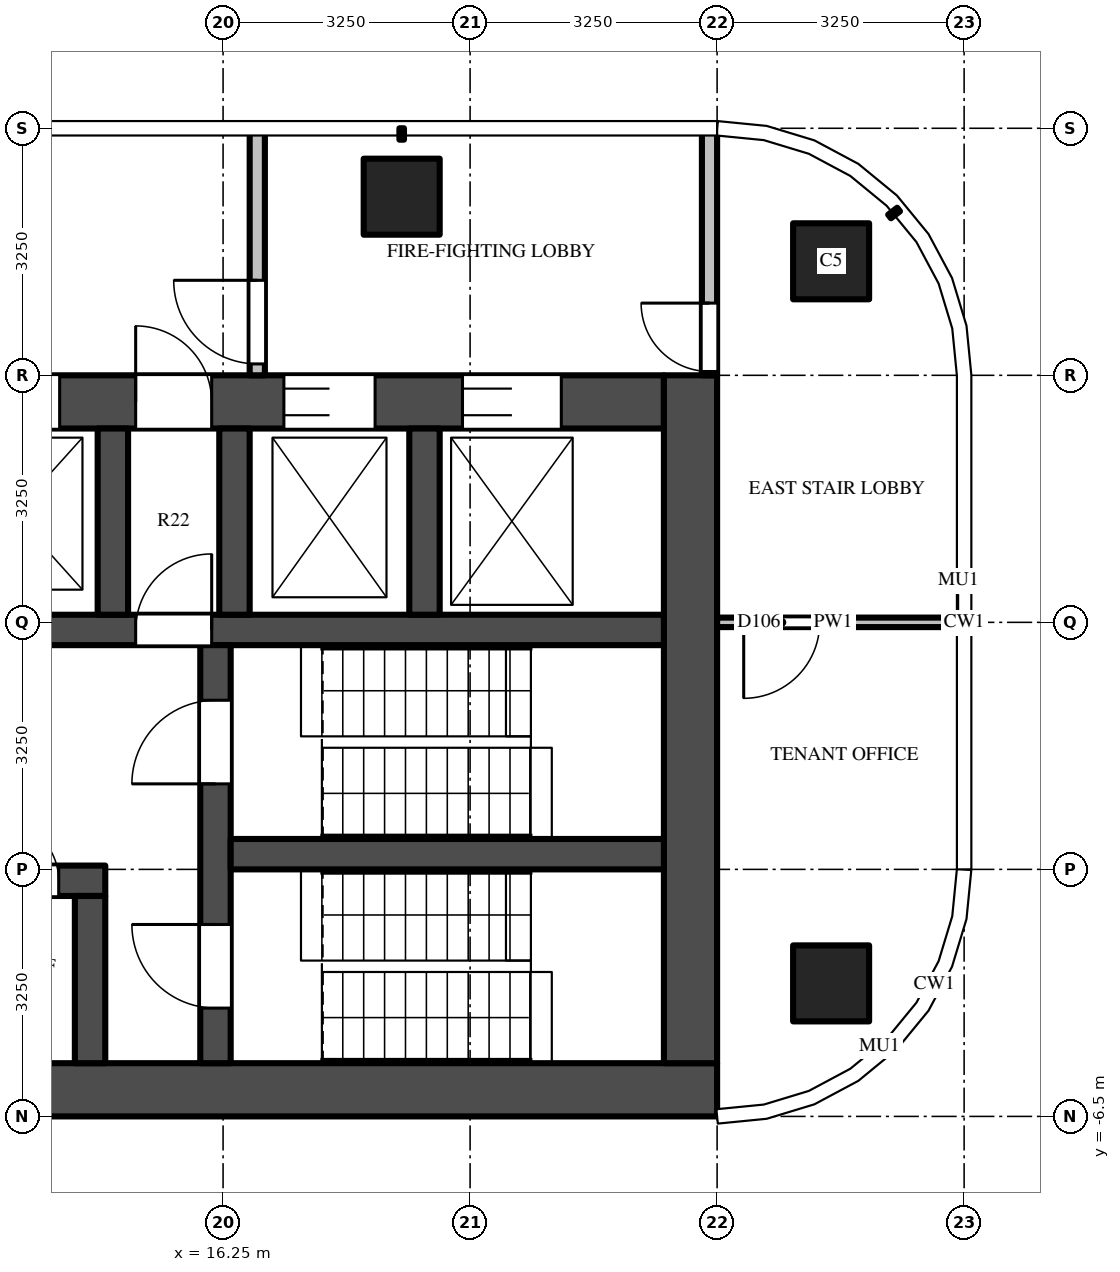
"""IFC4 building model, lengths in metres.
Left out: names, types, materials, properties, quantities, classifications, styles, units other than length and angle.
Written with IfcOpenShell. Run it as: python <this file> out.ifc"""

import sys

from ifc_helpers import new_model, si_unit, direction, frame, frame_2d, origin, origin_2d, place, context, subcontext, project, spatial, rectangle, extrude, source, transform, mapped, element, fill, save


model = new_model("IFC4")
c1 = context("Model", 3, precision=1e-05, world=origin(), true_north=direction((0.0, 1.0)))
c2 = subcontext(c1, "Body", "Model", "MODEL_VIEW")
j1 = project(units=[si_unit("LENGTHUNIT", "METRE"), si_unit("PLANEANGLEUNIT", "RADIAN")], contexts=[c1])
p1 = place(None, origin())
s1 = spatial("IfcSite", under=j1, at=p1, CompositionType="ELEMENT")
p2 = place(p1, origin())
s2 = spatial("IfcBuilding", under=s1, at=p2, CompositionType="ELEMENT")
p3 = place(p2, frame((0.0, 0.0, 314.5)))
s3 = spatial("IfcBuildingStorey", under=s2, at=p3, CompositionType="ELEMENT", Elevation=314.5)
m1 = source(origin(), c2, "Body", "SweptSolid", [
    extrude(rectangle(XDim=1.0, YDim=1.0, at=origin_2d()), origin(), (0.0, 0.0, 1.0), 3.9),
])
for number, where, z_axis, x_axis in (
    (1, (18.6, 5.6, 0.0), (0.0, 0.0, 1.0), (1.0, 0.0, 0.0)),
    (2, (24.25, 4.75, 0.0), (0.0, 0.0, 1.0), (1.0, 0.0, 0.0)),
    (3, (24.25, -4.75, 0.0), (0.0, 0.0, 1.0), (1.0, 0.0, 0.0)),
):
    element("IfcColumn", number, at=place(p3, frame(where, z_axis=z_axis, x_axis=x_axis)), inside=s3, PredefinedType="COLUMN", context=c2, shape_type="MappedRepresentation", body=[
        mapped(m1, transform((0.0, 0.0, 0.0))),
    ])
m2 = source(origin(), c2, "Body", "SweptSolid", [
    extrude(rectangle(XDim=16.65, YDim=0.7, at=frame_2d((8.325, 0.0))), origin(), (0.0, 0.0, 1.0), 3.7),
])
p4 = place(p3, frame((6.1, -6.15, 0.0), z_axis=(0.0, 0.0, 1.0), x_axis=(1.0, 0.0, 0.0)))
e4 = element("IfcWall", 4, at=p4, inside=s3, PredefinedType="SHEAR", context=c2, shape_type="MappedRepresentation", body=[
    mapped(m2, transform((0.0, 0.0, 0.0))),
])
m3 = source(origin(), c2, "Body", "SweptSolid", [
    extrude(rectangle(XDim=14.85, YDim=0.7, at=frame_2d((7.425, 0.0))), origin(), (0.0, 0.0, 1.0), 3.7),
])
p5 = place(p3, frame((7.2, 2.9, 0.0), z_axis=(0.0, 0.0, 1.0), x_axis=(1.0, 0.0, 0.0)))
e5 = element("IfcWall", 5, at=p5, inside=s3, PredefinedType="SHEAR", context=c2, shape_type="MappedRepresentation", body=[
    mapped(m3, transform((0.0, 0.0, 0.0))),
])
m4 = source(origin(), c2, "Body", "SweptSolid", [
    extrude(rectangle(XDim=1.2, YDim=2.1, at=frame_2d((0.6, 1.05))), frame((0.0, 0.36, 0.0), z_axis=(0.0, -1.0, 0.0), x_axis=(1.0, 0.0, 0.0)), (0.0, 0.0, 1.0), 0.72),
])
p6 = place(p5, frame((5.7, 0.0, 0.0)))
e6 = element("IfcOpeningElement", 6, at=p6, cuts=e5, PredefinedType="OPENING", context=c2, shape_type="MappedRepresentation", body=[
    mapped(m4, transform((0.0, 0.0, 0.0))),
])
m5 = source(origin(), c2, "Body", "SweptSolid", [
    extrude(rectangle(XDim=1.3, YDim=2.1, at=frame_2d((0.65, 1.05))), frame((0.0, 0.36, 0.0), z_axis=(0.0, -1.0, 0.0), x_axis=(1.0, 0.0, 0.0)), (0.0, 0.0, 1.0), 0.72),
])
p7 = place(p5, frame((12.2, 0.0, 0.0)))
e7 = element("IfcOpeningElement", 7, at=p7, cuts=e5, PredefinedType="OPENING", context=c2, shape_type="MappedRepresentation", body=[
    mapped(m5, transform((0.0, 0.0, 0.0))),
])
p8 = place(p5, frame((9.85, 0.0, 0.0)))
e8 = element("IfcOpeningElement", 8, at=p8, cuts=e5, PredefinedType="OPENING", context=c2, shape_type="MappedRepresentation", body=[
    mapped(m4, transform((0.0, 0.0, 0.0))),
])
m6 = source(origin(), c2, "Body", "SweptSolid", [
    extrude(rectangle(XDim=1.0, YDim=2.1, at=frame_2d((0.5, 1.05))), frame((0.0, 0.36, 0.0), z_axis=(0.0, -1.0, 0.0), x_axis=(1.0, 0.0, 0.0)), (0.0, 0.0, 1.0), 0.72),
])
p9 = place(p5, frame((7.9, 0.0, 0.0)))
e9 = element("IfcOpeningElement", 9, at=p9, cuts=e5, PredefinedType="OPENING", context=c2, shape_type="MappedRepresentation", body=[
    mapped(m6, transform((0.0, 0.0, 0.0))),
])
p10 = place(p5, frame((1.262, 0.0, 0.0)))
e10 = element("IfcOpeningElement", 10, at=p10, cuts=e5, PredefinedType="OPENING", context=c2, shape_type="MappedRepresentation", body=[
    mapped(m6, transform((0.0, 0.0, 0.0))),
])
m7 = source(origin(), c2, "Body", "SweptSolid", [
    extrude(rectangle(XDim=0.8, YDim=2.1, at=frame_2d((0.4, 1.05))), frame((0.0, 0.36, 0.0), z_axis=(0.0, -1.0, 0.0), x_axis=(1.0, 0.0, 0.0)), (0.0, 0.0, 1.0), 0.72),
])
p11 = place(p5, frame((3.837, 0.0, 0.0)))
e11 = element("IfcOpeningElement", 11, at=p11, cuts=e5, PredefinedType="OPENING", context=c2, shape_type="MappedRepresentation", body=[
    mapped(m7, transform((0.0, 0.0, 0.0))),
])
m8 = source(origin(), c2, "Body", "SweptSolid", [
    extrude(rectangle(XDim=9.05, YDim=0.7, at=frame_2d((4.525, 0.0))), origin(), (0.0, 0.0, 1.0), 3.7),
])
p12 = place(p3, frame((22.4, -5.8, 0.0), z_axis=(0.0, 0.0, 1.0), x_axis=(0.0, 1.0, 0.0)))
e12 = element("IfcWall", 12, at=p12, inside=s3, PredefinedType="SHEAR", context=c2, shape_type="MappedRepresentation", body=[
    mapped(m8, transform((0.0, 0.0, 0.0))),
])
m9 = source(origin(), c2, "Body", "SweptSolid", [
    extrude(rectangle(XDim=7.5, YDim=0.4, at=frame_2d((3.75, 0.0))), origin(), (0.0, 0.0, 1.0), 3.7),
])
p13 = place(p3, frame((7.2, -3.4, 0.0), z_axis=(0.0, 0.0, 1.0), x_axis=(1.0, 0.0, 0.0)))
e13 = element("IfcWall", 13, at=p13, inside=s3, PredefinedType="SHEAR", context=c2, shape_type="MappedRepresentation", body=[
    mapped(m9, transform((0.0, 0.0, 0.0))),
])
m10 = source(origin(), c2, "Body", "SweptSolid", [
    extrude(rectangle(XDim=0.8, YDim=2.1, at=frame_2d((0.4, 1.05))), frame((0.0, 0.21, 0.0), z_axis=(0.0, -1.0, 0.0), x_axis=(1.0, 0.0, 0.0)), (0.0, 0.0, 1.0), 0.42),
])
p14 = place(p13, frame((0.212, 0.0, 0.0)))
e14 = element("IfcOpeningElement", 14, at=p14, cuts=e13, PredefinedType="OPENING", context=c2, shape_type="MappedRepresentation", body=[
    mapped(m10, transform((0.0, 0.0, 0.0))),
])
m11 = source(origin(), c2, "Body", "SweptSolid", [
    extrude(rectangle(XDim=1.0, YDim=2.1, at=frame_2d((0.5, 1.05))), frame((0.0, 0.21, 0.0), z_axis=(0.0, -1.0, 0.0), x_axis=(1.0, 0.0, 0.0)), (0.0, 0.0, 1.0), 0.42),
])
p15 = place(p13, frame((3.05, 0.0, 0.0)))
e15 = element("IfcOpeningElement", 15, at=p15, cuts=e13, PredefinedType="OPENING", context=c2, shape_type="MappedRepresentation", body=[
    mapped(m11, transform((0.0, 0.0, 0.0))),
])
p16 = place(p13, frame((6.087, 0.0, 0.0)))
e16 = element("IfcOpeningElement", 16, at=p16, cuts=e13, PredefinedType="OPENING", context=c2, shape_type="MappedRepresentation", body=[
    mapped(m10, transform((0.0, 0.0, 0.0))),
])
m12 = source(origin(), c2, "Body", "SweptSolid", [
    extrude(rectangle(XDim=14.85, YDim=0.4, at=frame_2d((7.425, 0.0))), origin(), (0.0, 0.0, 1.0), 3.7),
])
p17 = place(p3, frame((7.2, -0.1, 0.0), z_axis=(0.0, 0.0, 1.0), x_axis=(1.0, 0.0, 0.0)))
e17 = element("IfcWall", 17, at=p17, inside=s3, PredefinedType="SHEAR", context=c2, shape_type="MappedRepresentation", body=[
    mapped(m12, transform((0.0, 0.0, 0.0))),
])
p18 = place(p17, frame((7.9, 0.0, 0.0)))
e18 = element("IfcOpeningElement", 18, at=p18, cuts=e17, PredefinedType="OPENING", context=c2, shape_type="MappedRepresentation", body=[
    mapped(m11, transform((0.0, 0.0, 0.0))),
])
m13 = source(origin(), c2, "Body", "SweptSolid", [
    extrude(rectangle(XDim=5.5, YDim=0.4, at=frame_2d((2.75, 0.0))), origin(), (0.0, 0.0, 1.0), 3.7),
])
p19 = place(p3, frame((16.15, -5.8, 0.0), z_axis=(0.0, 0.0, 1.0), x_axis=(0.0, 1.0, 0.0)))
e19 = element("IfcWall", 19, at=p19, inside=s3, PredefinedType="SHEAR", context=c2, shape_type="MappedRepresentation", body=[
    mapped(m13, transform((0.0, 0.0, 0.0))),
])
m14 = source(origin(), c2, "Body", "SweptSolid", [
    extrude(rectangle(XDim=1.1, YDim=2.1, at=frame_2d((0.55, 1.05))), frame((0.0, 0.21, 0.0), z_axis=(0.0, -1.0, 0.0), x_axis=(1.0, 0.0, 0.0)), (0.0, 0.0, 1.0), 0.42),
])
p20 = place(p19, frame((0.725, 0.0, 0.0)))
e20 = element("IfcOpeningElement", 20, at=p20, cuts=e19, PredefinedType="OPENING", context=c2, shape_type="MappedRepresentation", body=[
    mapped(m14, transform((0.0, 0.0, 0.0))),
])
p21 = place(p19, frame((3.675, 0.0, 0.0)))
e21 = element("IfcOpeningElement", 21, at=p21, cuts=e19, PredefinedType="OPENING", context=c2, shape_type="MappedRepresentation", body=[
    mapped(m14, transform((0.0, 0.0, 0.0))),
])
m15 = source(origin(), c2, "Body", "SweptSolid", [
    extrude(rectangle(XDim=5.7, YDim=0.4, at=frame_2d((2.85, 0.0))), origin(), (0.0, 0.0, 1.0), 3.7),
])
p22 = place(p3, frame((16.35, -3.05, 0.0), z_axis=(0.0, 0.0, 1.0), x_axis=(1.0, 0.0, 0.0)))
e22 = element("IfcWall", 22, at=p22, inside=s3, PredefinedType="SHEAR", context=c2, shape_type="MappedRepresentation", body=[
    mapped(m15, transform((0.0, 0.0, 0.0))),
])
m16 = source(origin(), c2, "Body", "SweptSolid", [
    extrude(rectangle(XDim=2.2, YDim=0.4, at=frame_2d((1.1, 0.0))), origin(), (0.0, 0.0, 1.0), 3.7),
])
p23 = place(p3, frame((14.5, -5.8, 0.0), z_axis=(0.0, 0.0, 1.0), x_axis=(0.0, 1.0, 0.0)))
e23 = element("IfcWall", 23, at=p23, inside=s3, PredefinedType="SHEAR", context=c2, shape_type="MappedRepresentation", body=[
    mapped(m16, transform((0.0, 0.0, 0.0))),
])
m17 = source(origin(), c2, "Body", "SweptSolid", [
    extrude(rectangle(XDim=2.45, YDim=0.4, at=frame_2d((1.225, 0.0))), origin(), (0.0, 0.0, 1.0), 3.7),
])
for number, where, z_axis, x_axis in (
    (24, (14.8, 0.1, 0.0), (0.0, 0.0, 1.0), (0.0, 1.0, 0.0)),
    (25, (16.4, 0.1, 0.0), (0.0, 0.0, 1.0), (0.0, 1.0, 0.0)),
    (26, (18.9, 0.1, 0.0), (0.0, 0.0, 1.0), (0.0, 1.0, 0.0)),
):
    element("IfcWall", number, at=place(p3, frame(where, z_axis=z_axis, x_axis=x_axis)), inside=s3, PredefinedType="SHEAR", context=c2, shape_type="MappedRepresentation", body=[
        mapped(m17, transform((0.0, 0.0, 0.0))),
    ])
m18 = source(origin(), c2, "Body", "SweptSolid", [
    extrude(rectangle(XDim=3.25, YDim=0.2, at=frame_2d((1.625, 0.0))), origin(), (0.0, 0.0, 1.0), 3.7),
])
p24 = place(p3, frame((16.7, 3.25, 0.0), z_axis=(0.0, 0.0, 1.0), x_axis=(0.0, 1.0, 0.0)))
e27 = element("IfcWall", 27, at=p24, inside=s3, PredefinedType="PARTITIONING", context=c2, shape_type="MappedRepresentation", body=[
    mapped(m18, transform((0.0, 0.0, 0.0))),
])
m19 = source(origin(), c2, "Body", "SweptSolid", [
    extrude(rectangle(XDim=1.1, YDim=2.1, at=frame_2d((0.55, 1.05))), frame((0.0, 0.11, 0.0), z_axis=(0.0, -1.0, 0.0), x_axis=(1.0, 0.0, 0.0)), (0.0, 0.0, 1.0), 0.22),
])
p25 = place(p24, frame((0.15, 0.0, 0.0)))
e28 = element("IfcOpeningElement", 28, at=p25, cuts=e27, PredefinedType="OPENING", context=c2, shape_type="MappedRepresentation", body=[
    mapped(m19, transform((0.0, 0.0, 0.0))),
])
p26 = place(p3, frame((22.65, 3.25, 0.0), z_axis=(0.0, 0.0, 1.0), x_axis=(0.0, 1.0, 0.0)))
e29 = element("IfcWall", 29, at=p26, inside=s3, PredefinedType="PARTITIONING", context=c2, shape_type="MappedRepresentation", body=[
    mapped(m18, transform((0.0, 0.0, 0.0))),
])
m20 = source(origin(), c2, "Body", "SweptSolid", [
    extrude(rectangle(XDim=0.9, YDim=2.1, at=frame_2d((0.45, 1.05))), frame((0.0, 0.11, 0.0), z_axis=(0.0, -1.0, 0.0), x_axis=(1.0, 0.0, 0.0)), (0.0, 0.0, 1.0), 0.22),
])
p27 = place(p26, frame((0.05, 0.0, 0.0)))
e30 = element("IfcOpeningElement", 30, at=p27, cuts=e29, PredefinedType="OPENING", context=c2, shape_type="MappedRepresentation", body=[
    mapped(m20, transform((0.0, 0.0, 0.0))),
])
m21 = source(origin(), c2, "Body", "SweptSolid", [
    extrude(rectangle(XDim=3.05, YDim=0.125, at=frame_2d((1.525, 0.0))), origin(), (0.0, 0.0, 1.0), 2.78),
])
p28 = place(p3, frame((25.8, 0.0, 0.0), z_axis=(0.0, 0.0, 1.0), x_axis=(-1.0, 0.0, 0.0)))
e31 = element("IfcWall", 31, at=p28, inside=s3, PredefinedType="PARTITIONING", context=c2, shape_type="MappedRepresentation", body=[
    mapped(m21, transform((0.0, 0.0, 0.0))),
])
m22 = source(origin(), c2, "Body", "SweptSolid", [
    extrude(rectangle(XDim=1.0, YDim=2.1, at=frame_2d((0.5, 1.05))), frame((0.0, 0.073, 0.0), z_axis=(0.0, -1.0, 0.0), x_axis=(1.0, 0.0, 0.0)), (0.0, 0.0, 1.0), 0.145),
])
p29 = place(p28, frame((1.7, 0.0, 0.0)))
e32 = element("IfcOpeningElement", 32, at=p29, cuts=e31, PredefinedType="OPENING", context=c2, shape_type="MappedRepresentation", body=[
    mapped(m22, transform((0.0, 0.0, 0.0))),
])
m23 = source(origin(), c2, "Body", "SweptSolid", [
    extrude(rectangle(XDim=1.2, YDim=2.1, at=frame_2d((0.6, 1.05))), frame((0.0, -0.275, 0.0), z_axis=(0.0, -1.0, 0.0), x_axis=(1.0, 0.0, 0.0)), (0.0, 0.0, 1.0), 0.05),
])
p30 = place(p6, origin())
e33 = element("IfcDoor", 33, at=p30, inside=s3, OperationType="DOUBLE_DOOR_SLIDING", PredefinedType="DOOR", context=c2, shape_type="MappedRepresentation", body=[
    mapped(m23, transform((0.0, 0.0, 0.0))),
])
fill(e6, e33)
m24 = source(origin(), c2, "Body", "SweptSolid", [
    extrude(rectangle(XDim=1.3, YDim=2.1, at=frame_2d((0.65, 1.05))), frame((0.0, -0.275, 0.0), z_axis=(0.0, -1.0, 0.0), x_axis=(1.0, 0.0, 0.0)), (0.0, 0.0, 1.0), 0.05),
])
p31 = place(p7, origin())
e34 = element("IfcDoor", 34, at=p31, inside=s3, OperationType="DOUBLE_DOOR_SLIDING", PredefinedType="DOOR", context=c2, shape_type="MappedRepresentation", body=[
    mapped(m24, transform((0.0, 0.0, 0.0))),
])
fill(e7, e34)
p32 = place(p8, origin())
e35 = element("IfcDoor", 35, at=p32, inside=s3, OperationType="DOUBLE_DOOR_SLIDING", PredefinedType="DOOR", context=c2, shape_type="MappedRepresentation", body=[
    mapped(m23, transform((0.0, 0.0, 0.0))),
])
fill(e8, e35)
m25 = source(origin(), c2, "Body", "SweptSolid", [
    extrude(rectangle(XDim=1.1, YDim=2.1, at=frame_2d((0.55, 1.05))), frame((0.0, 0.025, 0.0), z_axis=(0.0, -1.0, 0.0), x_axis=(1.0, 0.0, 0.0)), (0.0, 0.0, 1.0), 0.05),
])
p33 = place(p20, origin())
e36 = element("IfcDoor", 36, at=p33, inside=s3, OperationType="SINGLE_SWING_RIGHT", PredefinedType="DOOR", context=c2, shape_type="MappedRepresentation", body=[
    mapped(m25, transform((0.0, 0.0, 0.0))),
])
fill(e20, e36)
p34 = place(p21, origin())
e37 = element("IfcDoor", 37, at=p34, inside=s3, OperationType="SINGLE_SWING_LEFT", PredefinedType="DOOR", context=c2, shape_type="MappedRepresentation", body=[
    mapped(m25, transform((0.0, 0.0, 0.0))),
])
fill(e21, e37)
m26 = source(origin(), c2, "Body", "SweptSolid", [
    extrude(rectangle(XDim=1.0, YDim=2.1, at=frame_2d((0.5, 1.05))), frame((0.0, 0.025, 0.0), z_axis=(0.0, -1.0, 0.0), x_axis=(1.0, 0.0, 0.0)), (0.0, 0.0, 1.0), 0.05),
])
p35 = place(p18, origin())
e38 = element("IfcDoor", 38, at=p35, inside=s3, OperationType="SINGLE_SWING_RIGHT", PredefinedType="DOOR", context=c2, shape_type="MappedRepresentation", body=[
    mapped(m26, transform((0.0, 0.0, 0.0))),
])
fill(e18, e38)
m27 = source(origin(), c2, "Body", "SweptSolid", [
    extrude(rectangle(XDim=1.0, YDim=2.1, at=frame_2d((0.5, 1.05))), frame((0.0, -0.275, 0.0), z_axis=(0.0, -1.0, 0.0), x_axis=(1.0, 0.0, 0.0)), (0.0, 0.0, 1.0), 0.05),
])
p36 = place(p9, origin())
e39 = element("IfcDoor", 39, at=p36, inside=s3, OperationType="SINGLE_SWING_LEFT", PredefinedType="DOOR", context=c2, shape_type="MappedRepresentation", body=[
    mapped(m27, transform((0.0, 0.0, 0.0))),
])
fill(e9, e39)
p37 = place(p25, origin())
e40 = element("IfcDoor", 40, at=p37, inside=s3, OperationType="SINGLE_SWING_RIGHT", PredefinedType="DOOR", context=c2, shape_type="MappedRepresentation", body=[
    mapped(m25, transform((0.0, 0.0, 0.0))),
])
fill(e28, e40)
m28 = source(origin(), c2, "Body", "SweptSolid", [
    extrude(rectangle(XDim=0.9, YDim=2.1, at=frame_2d((0.45, 1.05))), frame((0.0, 0.025, 0.0), z_axis=(0.0, -1.0, 0.0), x_axis=(1.0, 0.0, 0.0)), (0.0, 0.0, 1.0), 0.05),
])
p38 = place(p27, origin())
e41 = element("IfcDoor", 41, at=p38, inside=s3, OperationType="SINGLE_SWING_RIGHT", PredefinedType="DOOR", context=c2, shape_type="MappedRepresentation", body=[
    mapped(m28, transform((0.0, 0.0, 0.0))),
])
fill(e30, e41)
m29 = source(origin(), c2, "Body", "SweptSolid", [
    extrude(rectangle(XDim=0.8, YDim=2.1, at=frame_2d((0.4, 1.05))), frame((0.0, 0.025, 0.0), z_axis=(0.0, -1.0, 0.0), x_axis=(1.0, 0.0, 0.0)), (0.0, 0.0, 1.0), 0.05),
])
p39 = place(p16, origin())
e42 = element("IfcDoor", 42, at=p39, inside=s3, OperationType="SINGLE_SWING_LEFT", PredefinedType="DOOR", context=c2, shape_type="MappedRepresentation", body=[
    mapped(m29, transform((0.0, 0.0, 0.0))),
])
fill(e16, e42)
p40 = place(p29, origin())
e43 = element("IfcDoor", 43, at=p40, inside=s3, OperationType="SINGLE_SWING_RIGHT", PredefinedType="DOOR", context=c2, shape_type="MappedRepresentation", body=[
    mapped(m26, transform((0.0, 0.0, 0.0))),
])
fill(e32, e43)
save(model, sys.argv[1])
